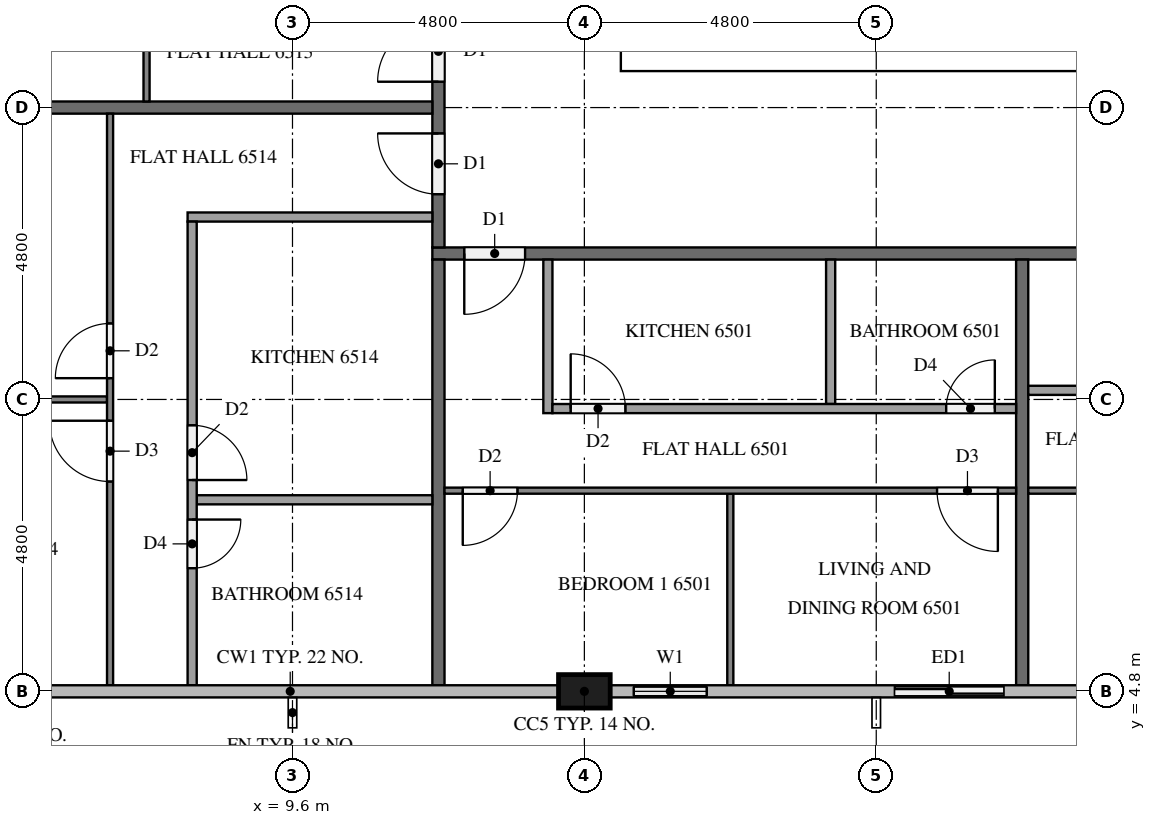
"""IFC4 building model, lengths in metres.
Left out: names, types, materials, properties, quantities, classifications, styles, units other than length and angle.
Written with IfcOpenShell. Run it as: python <this file> out.ifc"""

import sys

from ifc_helpers import new_model, si_unit, direction, frame, frame_2d, origin, origin_2d, place, context, subcontext, project, spatial, rectangle, extrude, element, fill, save


model = new_model("IFC4")
c1 = context("Model", 3, precision=1e-05, world=origin(), true_north=direction((0.0, 1.0)))
c2 = subcontext(c1, "Body", "Model", "MODEL_VIEW")
j1 = project(units=[si_unit("LENGTHUNIT", "METRE"), si_unit("PLANEANGLEUNIT", "RADIAN")], contexts=[c1])
p1 = place(None, origin())
s1 = spatial("IfcSite", under=j1, at=p1, CompositionType="ELEMENT")
p2 = place(p1, origin())
s2 = spatial("IfcBuilding", under=s1, at=p2, CompositionType="ELEMENT")
p3 = place(p2, frame((0.0, 0.0, 249.2)))
s3 = spatial("IfcBuildingStorey", under=s2, at=p3, CompositionType="ELEMENT", Elevation=249.2)
p4 = place(p3, frame((15.0, 15.3, 0.0), z_axis=(0.0, 0.0, 1.0), x_axis=(1.0, 0.0, 0.0)))
e1 = element("IfcWall", 1, at=p4, inside=s3, PredefinedType="SHEAR", context=c2, shape_type="SweptSolid", body=[
    extrude(rectangle(XDim=32.4, YDim=0.6, at=frame_2d((16.2, 0.0))), origin(), (0.0, 0.0, 1.0), 3.2),
])
p5 = place(p4, frame((15.3, 0.0, 0.0)))
e2 = element("IfcOpeningElement", 2, at=p5, cuts=e1, PredefinedType="OPENING", context=c2, shape_type="SweptSolid", body=[
    extrude(rectangle(XDim=1.8, YDim=2.1, at=frame_2d((0.9, 1.05))), frame((0.0, 0.31, 0.0), z_axis=(0.0, -1.0, 0.0), x_axis=(1.0, 0.0, 0.0)), (0.0, 0.0, 1.0), 0.62),
])
p6 = place(p3, frame((14.4, 4.8, 0.0), z_axis=(0.0, 0.0, 1.0), x_axis=(1.0, 0.0, 0.0)))
e3 = element("IfcColumn", 3, at=p6, inside=s3, PredefinedType="COLUMN", context=c2, shape_type="SweptSolid", body=[
    extrude(rectangle(XDim=0.85, YDim=0.55, at=origin_2d()), origin(), (0.0, 0.0, 1.0), 3.2),
])
p7 = place(p3, frame((14.825, 4.8, 0.0), z_axis=(0.0, 0.0, 1.0), x_axis=(1.0, 0.0, 0.0)))
e4 = element("IfcWall", 4, at=p7, inside=s3, PredefinedType="SOLIDWALL", context=c2, shape_type="SweptSolid", body=[
    extrude(rectangle(XDim=1.975, YDim=0.15, at=frame_2d((0.988, 0.0))), origin(), (0.0, 0.0, 1.0), 3.2),
])
p8 = place(p7, frame((0.387, 0.0, 0.9)))
e5 = element("IfcOpeningElement", 5, at=p8, cuts=e4, PredefinedType="OPENING", context=c2, shape_type="SweptSolid", body=[
    extrude(rectangle(XDim=1.2, YDim=1.4, at=frame_2d((0.6, 0.7))), frame((0.0, 0.085, 0.0), z_axis=(0.0, -1.0, 0.0), x_axis=(1.0, 0.0, 0.0)), (0.0, 0.0, 1.0), 0.17),
])
p9 = place(p3, frame((19.2, 4.8, 0.0), z_axis=(0.0, 0.0, 1.0), x_axis=(1.0, 0.0, 0.0)))
e6 = element("IfcWall", 6, at=p9, inside=s3, PredefinedType="SOLIDWALL", context=c2, shape_type="SweptSolid", body=[
    extrude(rectangle(XDim=2.4, YDim=0.15, at=frame_2d((1.2, 0.0))), origin(), (0.0, 0.0, 1.0), 3.2),
])
p10 = place(p9, frame((0.3, 0.0, 0.0)))
e7 = element("IfcOpeningElement", 7, at=p10, cuts=e6, PredefinedType="OPENING", context=c2, shape_type="SweptSolid", body=[
    extrude(rectangle(XDim=1.8, YDim=2.4, at=frame_2d((0.9, 1.2))), frame((0.0, 0.085, 0.0), z_axis=(0.0, -1.0, 0.0), x_axis=(1.0, 0.0, 0.0)), (0.0, 0.0, 1.0), 0.17),
])
p11 = place(p3, frame((50.5, 12.0, 0.0), z_axis=(0.0, 0.0, 1.0), x_axis=(-1.0, 0.0, 0.0)))
e8 = element("IfcWall", 8, at=p11, inside=s3, PredefinedType="PARTITIONING", context=c2, shape_type="SweptSolid", body=[
    extrude(rectangle(XDim=38.6, YDim=0.2, at=frame_2d((19.3, 0.0))), origin(), (0.0, 0.0, 1.0), 3.2),
])
p12 = place(p11, frame((37.075, 0.0, 0.0)))
e9 = element("IfcOpeningElement", 9, at=p12, cuts=e8, PredefinedType="OPENING", context=c2, shape_type="SweptSolid", body=[
    extrude(rectangle(XDim=1.0, YDim=2.1, at=frame_2d((0.5, 1.05))), frame((0.0, 0.11, 0.0), z_axis=(0.0, -1.0, 0.0), x_axis=(1.0, 0.0, 0.0)), (0.0, 0.0, 1.0), 0.22),
])
p13 = place(p11, frame((12.525, 0.0, 0.0)))
e10 = element("IfcOpeningElement", 10, at=p13, cuts=e8, PredefinedType="OPENING", context=c2, shape_type="SweptSolid", body=[
    extrude(rectangle(XDim=1.0, YDim=2.1, at=frame_2d((0.5, 1.05))), frame((0.0, 0.11, 0.0), z_axis=(0.0, -1.0, 0.0), x_axis=(1.0, 0.0, 0.0)), (0.0, 0.0, 1.0), 0.22),
])
p14 = place(p11, frame((10.675, 0.0, 0.0)))
e11 = element("IfcOpeningElement", 11, at=p14, cuts=e8, PredefinedType="OPENING", context=c2, shape_type="SweptSolid", body=[
    extrude(rectangle(XDim=1.0, YDim=2.1, at=frame_2d((0.5, 1.05))), frame((0.0, 0.11, 0.0), z_axis=(0.0, -1.0, 0.0), x_axis=(1.0, 0.0, 0.0)), (0.0, 0.0, 1.0), 0.22),
])
p15 = place(p3, frame((12.0, 12.1, 0.0), z_axis=(0.0, 0.0, 1.0), x_axis=(0.0, 1.0, 0.0)))
e12 = element("IfcWall", 12, at=p15, inside=s3, PredefinedType="PARTITIONING", context=c2, shape_type="SweptSolid", body=[
    extrude(rectangle(XDim=28.6, YDim=0.2, at=frame_2d((14.3, 0.0))), origin(), (0.0, 0.0, 1.0), 3.2),
])
p16 = place(p15, frame((26.725, 0.0, 0.0)))
e13 = element("IfcOpeningElement", 13, at=p16, cuts=e12, PredefinedType="OPENING", context=c2, shape_type="SweptSolid", body=[
    extrude(rectangle(XDim=1.0, YDim=2.1, at=frame_2d((0.5, 1.05))), frame((0.0, 0.11, 0.0), z_axis=(0.0, -1.0, 0.0), x_axis=(1.0, 0.0, 0.0)), (0.0, 0.0, 1.0), 0.22),
])
p17 = place(p15, frame((24.875, 0.0, 0.0)))
e14 = element("IfcOpeningElement", 14, at=p17, cuts=e12, PredefinedType="OPENING", context=c2, shape_type="SweptSolid", body=[
    extrude(rectangle(XDim=1.0, YDim=2.1, at=frame_2d((0.5, 1.05))), frame((0.0, 0.11, 0.0), z_axis=(0.0, -1.0, 0.0), x_axis=(1.0, 0.0, 0.0)), (0.0, 0.0, 1.0), 0.22),
])
p18 = place(p15, frame((17.675, 0.0, 0.0)))
e15 = element("IfcOpeningElement", 15, at=p18, cuts=e12, PredefinedType="OPENING", context=c2, shape_type="SweptSolid", body=[
    extrude(rectangle(XDim=1.0, YDim=2.1, at=frame_2d((0.5, 1.05))), frame((0.0, 0.11, 0.0), z_axis=(0.0, -1.0, 0.0), x_axis=(1.0, 0.0, 0.0)), (0.0, 0.0, 1.0), 0.22),
])
p19 = place(p15, frame((2.725, 0.0, 0.0)))
e16 = element("IfcOpeningElement", 16, at=p19, cuts=e12, PredefinedType="OPENING", context=c2, shape_type="SweptSolid", body=[
    extrude(rectangle(XDim=1.0, YDim=2.1, at=frame_2d((0.5, 1.05))), frame((0.0, 0.11, 0.0), z_axis=(0.0, -1.0, 0.0), x_axis=(1.0, 0.0, 0.0)), (0.0, 0.0, 1.0), 0.22),
])
p20 = place(p15, frame((0.875, 0.0, 0.0)))
e17 = element("IfcOpeningElement", 17, at=p20, cuts=e12, PredefinedType="OPENING", context=c2, shape_type="SweptSolid", body=[
    extrude(rectangle(XDim=1.0, YDim=2.1, at=frame_2d((0.5, 1.05))), frame((0.0, 0.11, 0.0), z_axis=(0.0, -1.0, 0.0), x_axis=(1.0, 0.0, 0.0)), (0.0, 0.0, 1.0), 0.22),
])
for number, where, z_axis, x_axis in (
    (18, (21.6, 11.9, 0.0), (0.0, 0.0, 1.0), (0.0, -1.0, 0.0)),
    (19, (12.0, 4.9, 0.0), (0.0, 0.0, 1.0), (0.0, 1.0, 0.0)),
):
    element("IfcWall", number, at=place(p3, frame(where, z_axis=z_axis, x_axis=x_axis)), inside=s3, PredefinedType="PARTITIONING", context=c2, shape_type="SweptSolid", body=[
        extrude(rectangle(XDim=7.0, YDim=0.2, at=frame_2d((3.5, 0.0))), origin(), (0.0, 0.0, 1.0), 3.2),
    ])
p21 = place(p3, frame((0.1, 14.4, 0.0), z_axis=(0.0, 0.0, 1.0), x_axis=(1.0, 0.0, 0.0)))
e20 = element("IfcWall", 20, at=p21, inside=s3, PredefinedType="PARTITIONING", context=c2, shape_type="SweptSolid", body=[
    extrude(rectangle(XDim=11.8, YDim=0.2, at=frame_2d((5.9, 0.0))), origin(), (0.0, 0.0, 1.0), 3.2),
])
p22 = place(p3, frame((16.8, 8.05, 0.0), z_axis=(0.0, 0.0, 1.0), x_axis=(0.0, -1.0, 0.0)))
e21 = element("IfcWall", 21, at=p22, inside=s3, PredefinedType="PARTITIONING", context=c2, shape_type="SweptSolid", body=[
    extrude(rectangle(XDim=3.15, YDim=0.1, at=frame_2d((1.575, 0.0))), origin(), (0.0, 0.0, 1.0), 3.2),
])
p23 = place(p3, frame((21.5, 8.1, 0.0), z_axis=(0.0, 0.0, 1.0), x_axis=(-1.0, 0.0, 0.0)))
e22 = element("IfcWall", 22, at=p23, inside=s3, PredefinedType="PARTITIONING", context=c2, shape_type="SweptSolid", body=[
    extrude(rectangle(XDim=9.4, YDim=0.1, at=frame_2d((4.7, 0.0))), origin(), (0.0, 0.0, 1.0), 3.2),
])
p24 = place(p23, frame((8.2, 0.0, 0.0)))
e23 = element("IfcOpeningElement", 23, at=p24, cuts=e22, PredefinedType="OPENING", context=c2, shape_type="SweptSolid", body=[
    extrude(rectangle(XDim=0.9, YDim=2.1, at=frame_2d((0.45, 1.05))), frame((0.0, 0.06, 0.0), z_axis=(0.0, -1.0, 0.0), x_axis=(1.0, 0.0, 0.0)), (0.0, 0.0, 1.0), 0.12),
])
p25 = place(p23, frame((0.3, 0.0, 0.0)))
e24 = element("IfcOpeningElement", 24, at=p25, cuts=e22, PredefinedType="OPENING", context=c2, shape_type="SweptSolid", body=[
    extrude(rectangle(XDim=1.0, YDim=2.1, at=frame_2d((0.5, 1.05))), frame((0.0, 0.06, 0.0), z_axis=(0.0, -1.0, 0.0), x_axis=(1.0, 0.0, 0.0)), (0.0, 0.0, 1.0), 0.12),
])
p26 = place(p3, frame((18.45, 11.9, 0.0), z_axis=(0.0, 0.0, 1.0), x_axis=(0.0, -1.0, 0.0)))
e25 = element("IfcWall", 25, at=p26, inside=s3, PredefinedType="PARTITIONING", context=c2, shape_type="SweptSolid", body=[
    extrude(rectangle(XDim=2.375, YDim=0.15, at=frame_2d((1.188, 0.0))), origin(), (0.0, 0.0, 1.0), 3.2),
])
p27 = place(p3, frame((13.8, 11.9, 0.0), z_axis=(0.0, 0.0, 1.0), x_axis=(0.0, -1.0, 0.0)))
e26 = element("IfcWall", 26, at=p27, inside=s3, PredefinedType="PARTITIONING", context=c2, shape_type="SweptSolid", body=[
    extrude(rectangle(XDim=2.525, YDim=0.15, at=frame_2d((1.262, 0.0))), origin(), (0.0, 0.0, 1.0), 3.2),
])
p28 = place(p3, frame((13.875, 9.45, 0.0), z_axis=(0.0, 0.0, 1.0), x_axis=(1.0, 0.0, 0.0)))
e27 = element("IfcWall", 27, at=p28, inside=s3, PredefinedType="PARTITIONING", context=c2, shape_type="SweptSolid", body=[
    extrude(rectangle(XDim=7.625, YDim=0.15, at=frame_2d((3.812, 0.0))), origin(), (0.0, 0.0, 1.0), 3.2),
])
p29 = place(p28, frame((0.3, 0.0, 0.0)))
e28 = element("IfcOpeningElement", 28, at=p29, cuts=e27, PredefinedType="OPENING", context=c2, shape_type="SweptSolid", body=[
    extrude(rectangle(XDim=0.9, YDim=2.1, at=frame_2d((0.45, 1.05))), frame((0.0, 0.085, 0.0), z_axis=(0.0, -1.0, 0.0), x_axis=(1.0, 0.0, 0.0)), (0.0, 0.0, 1.0), 0.17),
])
p30 = place(p28, frame((6.475, 0.0, 0.0)))
e29 = element("IfcOpeningElement", 29, at=p30, cuts=e27, PredefinedType="OPENING", context=c2, shape_type="SweptSolid", body=[
    extrude(rectangle(XDim=0.8, YDim=2.1, at=frame_2d((0.4, 1.05))), frame((0.0, 0.085, 0.0), z_axis=(0.0, -1.0, 0.0), x_axis=(1.0, 0.0, 0.0)), (0.0, 0.0, 1.0), 0.17),
])
p31 = place(p3, frame((38.3, 8.1, 0.0), z_axis=(0.0, 0.0, 1.0), x_axis=(-1.0, 0.0, 0.0)))
e30 = element("IfcWall", 30, at=p31, inside=s3, PredefinedType="PARTITIONING", context=c2, shape_type="SweptSolid", body=[
    extrude(rectangle(XDim=16.6, YDim=0.1, at=frame_2d((8.3, 0.0))), origin(), (0.0, 0.0, 1.0), 3.2),
])
p32 = place(p31, frame((0.3, 0.0, 0.0)))
e31 = element("IfcOpeningElement", 31, at=p32, cuts=e30, PredefinedType="OPENING", context=c2, shape_type="SweptSolid", body=[
    extrude(rectangle(XDim=0.9, YDim=2.1, at=frame_2d((0.45, 1.05))), frame((0.0, 0.06, 0.0), z_axis=(0.0, -1.0, 0.0), x_axis=(1.0, 0.0, 0.0)), (0.0, 0.0, 1.0), 0.12),
])
p33 = place(p31, frame((8.25, 0.0, 0.0)))
e32 = element("IfcOpeningElement", 32, at=p33, cuts=e30, PredefinedType="OPENING", context=c2, shape_type="SweptSolid", body=[
    extrude(rectangle(XDim=0.9, YDim=2.1, at=frame_2d((0.45, 1.05))), frame((0.0, 0.06, 0.0), z_axis=(0.0, -1.0, 0.0), x_axis=(1.0, 0.0, 0.0)), (0.0, 0.0, 1.0), 0.12),
])
p34 = place(p31, frame((9.85, 0.0, 0.0)))
e33 = element("IfcOpeningElement", 33, at=p34, cuts=e30, PredefinedType="OPENING", context=c2, shape_type="SweptSolid", body=[
    extrude(rectangle(XDim=1.0, YDim=2.1, at=frame_2d((0.5, 1.05))), frame((0.0, 0.06, 0.0), z_axis=(0.0, -1.0, 0.0), x_axis=(1.0, 0.0, 0.0)), (0.0, 0.0, 1.0), 0.12),
])
p35 = place(p3, frame((21.7, 9.75, 0.0), z_axis=(0.0, 0.0, 1.0), x_axis=(1.0, 0.0, 0.0)))
e34 = element("IfcWall", 34, at=p35, inside=s3, PredefinedType="PARTITIONING", context=c2, shape_type="SweptSolid", body=[
    extrude(rectangle(XDim=14.825, YDim=0.15, at=frame_2d((7.413, 0.0))), origin(), (0.0, 0.0, 1.0), 3.2),
])
p36 = place(p35, frame((13.725, 0.0, 0.0)))
e35 = element("IfcOpeningElement", 35, at=p36, cuts=e34, PredefinedType="OPENING", context=c2, shape_type="SweptSolid", body=[
    extrude(rectangle(XDim=0.8, YDim=2.1, at=frame_2d((0.4, 1.05))), frame((0.0, 0.085, 0.0), z_axis=(0.0, -1.0, 0.0), x_axis=(1.0, 0.0, 0.0)), (0.0, 0.0, 1.0), 0.17),
])
p37 = place(p35, frame((7.167, 0.0, 0.0)))
e36 = element("IfcOpeningElement", 36, at=p37, cuts=e34, PredefinedType="OPENING", context=c2, shape_type="SweptSolid", body=[
    extrude(rectangle(XDim=0.9, YDim=2.1, at=frame_2d((0.45, 1.05))), frame((0.0, 0.085, 0.0), z_axis=(0.0, -1.0, 0.0), x_axis=(1.0, 0.0, 0.0)), (0.0, 0.0, 1.0), 0.17),
])
p38 = place(p35, frame((5.617, 0.0, 0.0)))
e37 = element("IfcOpeningElement", 37, at=p38, cuts=e34, PredefinedType="OPENING", context=c2, shape_type="SweptSolid", body=[
    extrude(rectangle(XDim=0.9, YDim=2.1, at=frame_2d((0.45, 1.05))), frame((0.0, 0.085, 0.0), z_axis=(0.0, -1.0, 0.0), x_axis=(1.0, 0.0, 0.0)), (0.0, 0.0, 1.0), 0.17),
])
p39 = place(p3, frame((7.2, 14.5, 0.0), z_axis=(0.0, 0.0, 1.0), x_axis=(0.0, 1.0, 0.0)))
e38 = element("IfcWall", 38, at=p39, inside=s3, PredefinedType="PARTITIONING", context=c2, shape_type="SweptSolid", body=[
    extrude(rectangle(XDim=9.4, YDim=0.1, at=frame_2d((4.7, 0.0))), origin(), (0.0, 0.0, 1.0), 3.2),
])
p40 = place(p39, frame((3.45, 0.0, 0.0)))
e39 = element("IfcOpeningElement", 39, at=p40, cuts=e38, PredefinedType="OPENING", context=c2, shape_type="SweptSolid", body=[
    extrude(rectangle(XDim=0.9, YDim=2.1, at=frame_2d((0.45, 1.05))), frame((0.0, 0.06, 0.0), z_axis=(0.0, -1.0, 0.0), x_axis=(1.0, 0.0, 0.0)), (0.0, 0.0, 1.0), 0.12),
])
p41 = place(p39, frame((5.05, 0.0, 0.0)))
e40 = element("IfcOpeningElement", 40, at=p41, cuts=e38, PredefinedType="OPENING", context=c2, shape_type="SweptSolid", body=[
    extrude(rectangle(XDim=1.0, YDim=2.1, at=frame_2d((0.5, 1.05))), frame((0.0, 0.06, 0.0), z_axis=(0.0, -1.0, 0.0), x_axis=(1.0, 0.0, 0.0)), (0.0, 0.0, 1.0), 0.12),
])
p42 = place(p3, frame((6.55, 9.6, 0.0), z_axis=(0.0, 0.0, 1.0), x_axis=(-1.0, 0.0, 0.0)))
e41 = element("IfcWall", 41, at=p42, inside=s3, PredefinedType="PARTITIONING", context=c2, shape_type="SweptSolid", body=[
    extrude(rectangle(XDim=6.2, YDim=0.1, at=frame_2d((3.1, 0.0))), origin(), (0.0, 0.0, 1.0), 3.2),
])
p43 = place(p3, frame((6.6, 4.9, 0.0), z_axis=(0.0, 0.0, 1.0), x_axis=(0.0, 1.0, 0.0)))
e42 = element("IfcWall", 42, at=p43, inside=s3, PredefinedType="PARTITIONING", context=c2, shape_type="SweptSolid", body=[
    extrude(rectangle(XDim=9.4, YDim=0.1, at=frame_2d((4.7, 0.0))), origin(), (0.0, 0.0, 1.0), 3.2),
])
p44 = place(p43, frame((5.05, 0.0, 0.0)))
e43 = element("IfcOpeningElement", 43, at=p44, cuts=e42, PredefinedType="OPENING", context=c2, shape_type="SweptSolid", body=[
    extrude(rectangle(XDim=0.9, YDim=2.1, at=frame_2d((0.45, 1.05))), frame((0.0, 0.06, 0.0), z_axis=(0.0, -1.0, 0.0), x_axis=(1.0, 0.0, 0.0)), (0.0, 0.0, 1.0), 0.12),
])
p45 = place(p43, frame((3.35, 0.0, 0.0)))
e44 = element("IfcOpeningElement", 44, at=p45, cuts=e42, PredefinedType="OPENING", context=c2, shape_type="SweptSolid", body=[
    extrude(rectangle(XDim=1.0, YDim=2.1, at=frame_2d((0.5, 1.05))), frame((0.0, 0.06, 0.0), z_axis=(0.0, -1.0, 0.0), x_axis=(1.0, 0.0, 0.0)), (0.0, 0.0, 1.0), 0.12),
])
p46 = place(p3, frame((11.9, 7.95, 0.0), z_axis=(0.0, 0.0, 1.0), x_axis=(-1.0, 0.0, 0.0)))
e45 = element("IfcWall", 45, at=p46, inside=s3, PredefinedType="PARTITIONING", context=c2, shape_type="SweptSolid", body=[
    extrude(rectangle(XDim=3.875, YDim=0.15, at=frame_2d((1.938, 0.0))), origin(), (0.0, 0.0, 1.0), 3.2),
])
p47 = place(p3, frame((11.9, 12.6, 0.0), z_axis=(0.0, 0.0, 1.0), x_axis=(-1.0, 0.0, 0.0)))
e46 = element("IfcWall", 46, at=p47, inside=s3, PredefinedType="PARTITIONING", context=c2, shape_type="SweptSolid", body=[
    extrude(rectangle(XDim=4.025, YDim=0.15, at=frame_2d((2.012, 0.0))), origin(), (0.0, 0.0, 1.0), 3.2),
])
p48 = place(p3, frame((7.95, 12.525, 0.0), z_axis=(0.0, 0.0, 1.0), x_axis=(0.0, -1.0, 0.0)))
e47 = element("IfcWall", 47, at=p48, inside=s3, PredefinedType="PARTITIONING", context=c2, shape_type="SweptSolid", body=[
    extrude(rectangle(XDim=7.625, YDim=0.15, at=frame_2d((3.812, 0.0))), origin(), (0.0, 0.0, 1.0), 3.2),
])
p49 = place(p48, frame((3.35, 0.0, 0.0)))
e48 = element("IfcOpeningElement", 48, at=p49, cuts=e47, PredefinedType="OPENING", context=c2, shape_type="SweptSolid", body=[
    extrude(rectangle(XDim=0.9, YDim=2.1, at=frame_2d((0.45, 1.05))), frame((0.0, 0.085, 0.0), z_axis=(0.0, -1.0, 0.0), x_axis=(1.0, 0.0, 0.0)), (0.0, 0.0, 1.0), 0.17),
])
p50 = place(p48, frame((4.9, 0.0, 0.0)))
e49 = element("IfcOpeningElement", 49, at=p50, cuts=e47, PredefinedType="OPENING", context=c2, shape_type="SweptSolid", body=[
    extrude(rectangle(XDim=0.8, YDim=2.1, at=frame_2d((0.4, 1.05))), frame((0.0, 0.085, 0.0), z_axis=(0.0, -1.0, 0.0), x_axis=(1.0, 0.0, 0.0)), (0.0, 0.0, 1.0), 0.17),
])
p51 = place(p8, origin())
e50 = element("IfcWindow", 50, at=p51, inside=s3, PartitioningType="SINGLE_PANEL", PredefinedType="WINDOW", context=c2, shape_type="SweptSolid", body=[
    extrude(rectangle(XDim=1.2, YDim=1.4, at=frame_2d((0.6, 0.7))), frame((0.0, 0.03, 0.0), z_axis=(0.0, -1.0, 0.0), x_axis=(1.0, 0.0, 0.0)), (0.0, 0.0, 1.0), 0.06),
])
fill(e5, e50)
p52 = place(p10, origin())
e51 = element("IfcDoor", 51, at=p52, inside=s3, OperationType="SLIDING_TO_LEFT", PredefinedType="DOOR", context=c2, shape_type="SweptSolid", body=[
    extrude(rectangle(XDim=1.8, YDim=2.4, at=frame_2d((0.9, 1.2))), frame((0.0, 0.025, 0.0), z_axis=(0.0, -1.0, 0.0), x_axis=(1.0, 0.0, 0.0)), (0.0, 0.0, 1.0), 0.05),
])
fill(e7, e51)
p53 = place(p12, origin())
e52 = element("IfcDoor", 52, at=p53, inside=s3, OperationType="SINGLE_SWING_RIGHT", PredefinedType="DOOR", context=c2, shape_type="SweptSolid", body=[
    extrude(rectangle(XDim=1.0, YDim=2.1, at=frame_2d((0.5, 1.05))), frame((0.0, 0.025, 0.0), z_axis=(0.0, -1.0, 0.0), x_axis=(1.0, 0.0, 0.0)), (0.0, 0.0, 1.0), 0.05),
])
fill(e9, e52)
p54 = place(p19, origin())
e53 = element("IfcDoor", 53, at=p54, inside=s3, OperationType="SINGLE_SWING_LEFT", PredefinedType="DOOR", context=c2, shape_type="SweptSolid", body=[
    extrude(rectangle(XDim=1.0, YDim=2.1, at=frame_2d((0.5, 1.05))), frame((0.0, 0.025, 0.0), z_axis=(0.0, -1.0, 0.0), x_axis=(1.0, 0.0, 0.0)), (0.0, 0.0, 1.0), 0.05),
])
fill(e16, e53)
p55 = place(p20, origin())
e54 = element("IfcDoor", 54, at=p55, inside=s3, OperationType="SINGLE_SWING_RIGHT", PredefinedType="DOOR", context=c2, shape_type="SweptSolid", body=[
    extrude(rectangle(XDim=1.0, YDim=2.1, at=frame_2d((0.5, 1.05))), frame((0.0, 0.025, 0.0), z_axis=(0.0, -1.0, 0.0), x_axis=(1.0, 0.0, 0.0)), (0.0, 0.0, 1.0), 0.05),
])
fill(e17, e54)
p56 = place(p24, origin())
e55 = element("IfcDoor", 55, at=p56, inside=s3, OperationType="SINGLE_SWING_RIGHT", PredefinedType="DOOR", context=c2, shape_type="SweptSolid", body=[
    extrude(rectangle(XDim=0.9, YDim=2.1, at=frame_2d((0.45, 1.05))), frame((0.0, 0.025, 0.0), z_axis=(0.0, -1.0, 0.0), x_axis=(1.0, 0.0, 0.0)), (0.0, 0.0, 1.0), 0.05),
])
fill(e23, e55)
p57 = place(p25, origin())
e56 = element("IfcDoor", 56, at=p57, inside=s3, OperationType="SINGLE_SWING_LEFT", PredefinedType="DOOR", context=c2, shape_type="SweptSolid", body=[
    extrude(rectangle(XDim=1.0, YDim=2.1, at=frame_2d((0.5, 1.05))), frame((0.0, 0.025, 0.0), z_axis=(0.0, -1.0, 0.0), x_axis=(1.0, 0.0, 0.0)), (0.0, 0.0, 1.0), 0.05),
])
fill(e24, e56)
p58 = place(p29, origin())
e57 = element("IfcDoor", 57, at=p58, inside=s3, OperationType="SINGLE_SWING_LEFT", PredefinedType="DOOR", context=c2, shape_type="SweptSolid", body=[
    extrude(rectangle(XDim=0.9, YDim=2.1, at=frame_2d((0.45, 1.05))), frame((0.0, 0.025, 0.0), z_axis=(0.0, -1.0, 0.0), x_axis=(1.0, 0.0, 0.0)), (0.0, 0.0, 1.0), 0.05),
])
fill(e28, e57)
p59 = place(p30, origin())
e58 = element("IfcDoor", 58, at=p59, inside=s3, OperationType="SINGLE_SWING_RIGHT", PredefinedType="DOOR", context=c2, shape_type="SweptSolid", body=[
    extrude(rectangle(XDim=0.8, YDim=2.1, at=frame_2d((0.4, 1.05))), frame((0.0, 0.025, 0.0), z_axis=(0.0, -1.0, 0.0), x_axis=(1.0, 0.0, 0.0)), (0.0, 0.0, 1.0), 0.05),
])
fill(e29, e58)
p60 = place(p44, origin())
e59 = element("IfcDoor", 59, at=p60, inside=s3, OperationType="SINGLE_SWING_LEFT", PredefinedType="DOOR", context=c2, shape_type="SweptSolid", body=[
    extrude(rectangle(XDim=0.9, YDim=2.1, at=frame_2d((0.45, 1.05))), frame((0.0, 0.025, 0.0), z_axis=(0.0, -1.0, 0.0), x_axis=(1.0, 0.0, 0.0)), (0.0, 0.0, 1.0), 0.05),
])
fill(e43, e59)
p61 = place(p45, origin())
e60 = element("IfcDoor", 60, at=p61, inside=s3, OperationType="SINGLE_SWING_RIGHT", PredefinedType="DOOR", context=c2, shape_type="SweptSolid", body=[
    extrude(rectangle(XDim=1.0, YDim=2.1, at=frame_2d((0.5, 1.05))), frame((0.0, 0.025, 0.0), z_axis=(0.0, -1.0, 0.0), x_axis=(1.0, 0.0, 0.0)), (0.0, 0.0, 1.0), 0.05),
])
fill(e44, e60)
p62 = place(p49, origin())
e61 = element("IfcDoor", 61, at=p62, inside=s3, OperationType="SINGLE_SWING_RIGHT", PredefinedType="DOOR", context=c2, shape_type="SweptSolid", body=[
    extrude(rectangle(XDim=0.9, YDim=2.1, at=frame_2d((0.45, 1.05))), frame((0.0, 0.025, 0.0), z_axis=(0.0, -1.0, 0.0), x_axis=(1.0, 0.0, 0.0)), (0.0, 0.0, 1.0), 0.05),
])
fill(e48, e61)
p63 = place(p50, origin())
e62 = element("IfcDoor", 62, at=p63, inside=s3, OperationType="SINGLE_SWING_LEFT", PredefinedType="DOOR", context=c2, shape_type="SweptSolid", body=[
    extrude(rectangle(XDim=0.8, YDim=2.1, at=frame_2d((0.4, 1.05))), frame((0.0, 0.025, 0.0), z_axis=(0.0, -1.0, 0.0), x_axis=(1.0, 0.0, 0.0)), (0.0, 0.0, 1.0), 0.05),
])
fill(e49, e62)
save(model, sys.argv[1])
